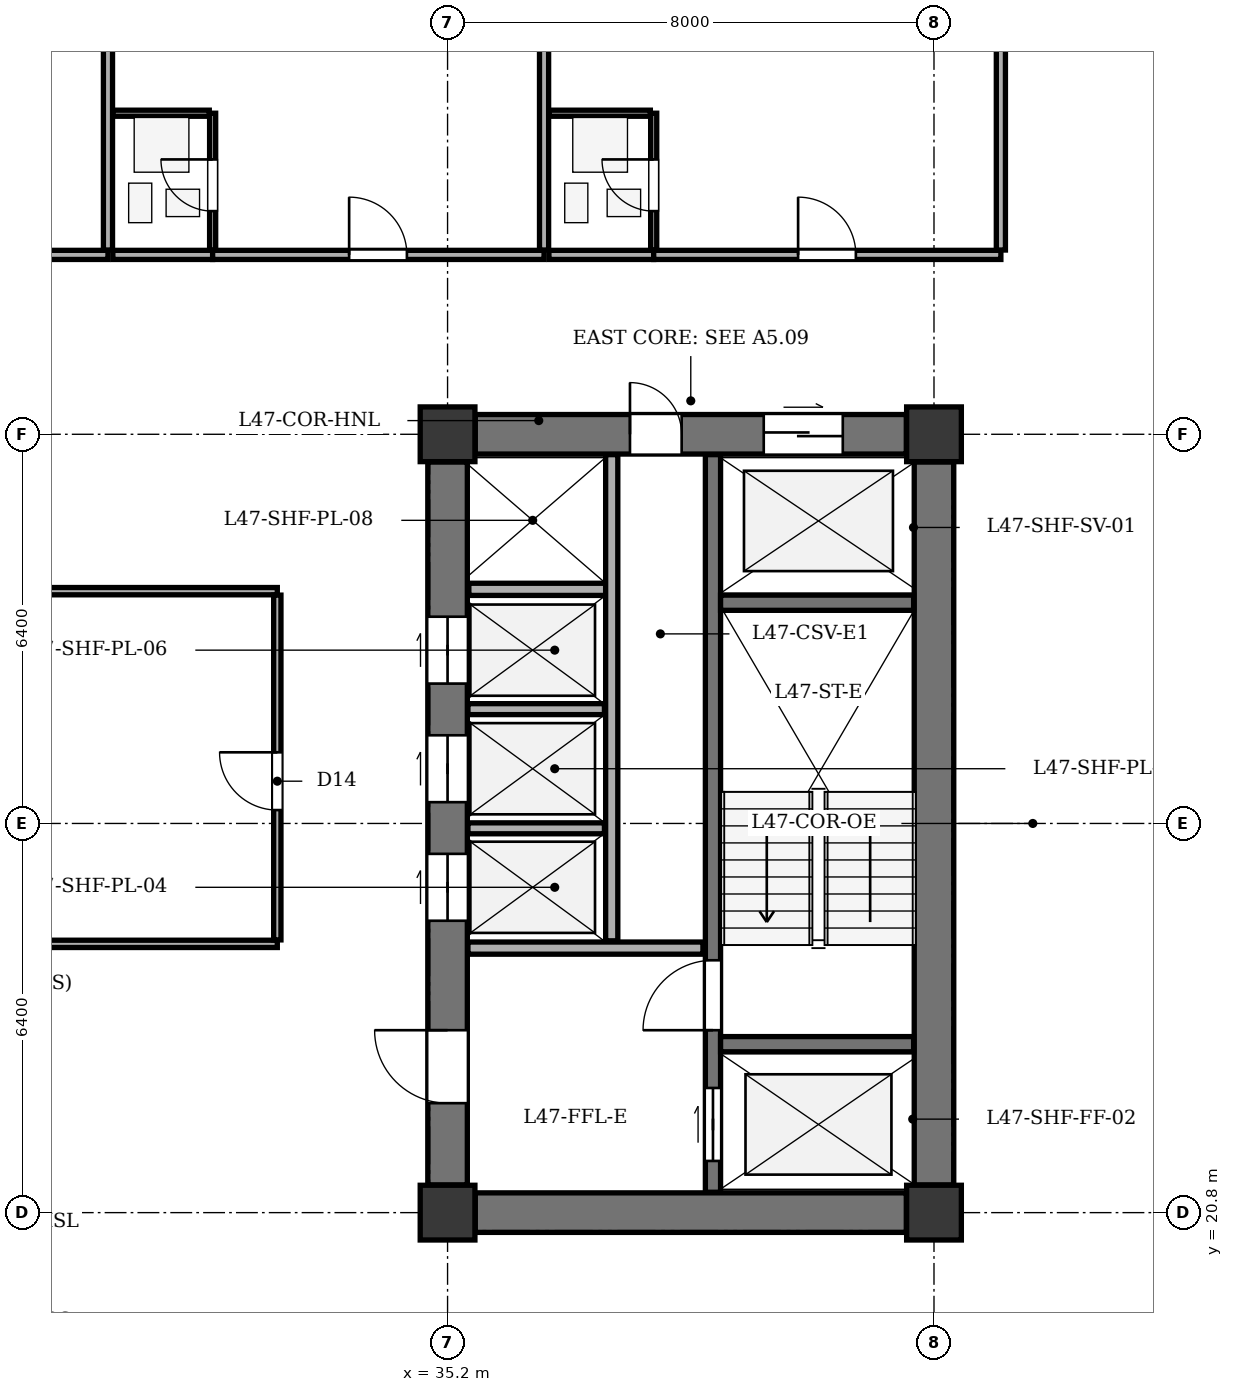
"""IFC4 building model, lengths in metres.
Left out: names, types, materials, properties, quantities, classifications, styles, units other than length and angle.
Written with IfcOpenShell. Run it as: python <this file> out.ifc"""

import sys

from ifc_helpers import new_model, si_unit, direction, frame, frame_2d, origin, origin_2d, place, context, subcontext, project, spatial, rectangle, extrude, element, fill, save


model = new_model("IFC4")
c1 = context("Model", 3, precision=1e-05, world=origin(), true_north=direction((0.0, 1.0)))
c2 = subcontext(c1, "Body", "Model", "MODEL_VIEW")
j1 = project(units=[si_unit("LENGTHUNIT", "METRE"), si_unit("PLANEANGLEUNIT", "RADIAN")], contexts=[c1])
p1 = place(None, origin())
s1 = spatial("IfcSite", under=j1, at=p1, CompositionType="ELEMENT")
p2 = place(p1, origin())
s2 = spatial("IfcBuilding", under=s1, at=p2, CompositionType="ELEMENT")
p3 = place(p2, frame((0.0, 0.0, 183.3)))
s3 = spatial("IfcBuildingStorey", under=s2, at=p3, CompositionType="ELEMENT", Elevation=183.3)
for number, where, z_axis, x_axis in (
    (1, (35.2, 20.8, 0.0), (0.0, 0.0, 1.0), (1.0, 0.0, 0.0)),
    (2, (43.2, 20.8, 0.0), (0.0, 0.0, 1.0), (1.0, 0.0, 0.0)),
    (3, (35.2, 33.6, 0.0), (0.0, 0.0, 1.0), (1.0, 0.0, 0.0)),
    (4, (43.2, 33.6, 0.0), (0.0, 0.0, 1.0), (1.0, 0.0, 0.0)),
):
    element("IfcColumn", number, at=place(p3, frame(where, z_axis=z_axis, x_axis=x_axis)), inside=s3, PredefinedType="COLUMN", context=c2, shape_type="SweptSolid", body=[
        extrude(rectangle(XDim=0.9, YDim=0.9, at=origin_2d()), origin(), (0.0, 0.0, 1.0), 3.5),
    ])
p4 = place(p3, frame((43.2, 21.255, 0.0), z_axis=(0.0, 0.0, 1.0), x_axis=(0.0, 1.0, 0.0)))
e5 = element("IfcWall", 5, at=p4, inside=s3, PredefinedType="SHEAR", context=c2, shape_type="SweptSolid", body=[
    extrude(rectangle(XDim=11.89, YDim=0.65, at=frame_2d((5.945, 0.0))), origin(), (0.0, 0.0, 1.0), 3.2),
])
p5 = place(p3, frame((35.655, 20.8, 0.0), z_axis=(0.0, 0.0, 1.0), x_axis=(1.0, 0.0, 0.0)))
e6 = element("IfcWall", 6, at=p5, inside=s3, PredefinedType="SHEAR", context=c2, shape_type="SweptSolid", body=[
    extrude(rectangle(XDim=7.09, YDim=0.65, at=frame_2d((3.545, 0.0))), origin(), (0.0, 0.0, 1.0), 3.2),
])
p6 = place(p3, frame((35.655, 33.6, 0.0), z_axis=(0.0, 0.0, 1.0), x_axis=(1.0, 0.0, 0.0)))
e7 = element("IfcWall", 7, at=p6, inside=s3, PredefinedType="SHEAR", context=c2, shape_type="SweptSolid", body=[
    extrude(rectangle(XDim=7.09, YDim=0.65, at=frame_2d((3.545, 0.0))), origin(), (0.0, 0.0, 1.0), 3.2),
])
p7 = place(p6, frame((4.745, 0.0, 0.0)))
e8 = element("IfcOpeningElement", 8, at=p7, cuts=e7, PredefinedType="OPENING", context=c2, shape_type="SweptSolid", body=[
    extrude(rectangle(XDim=1.3, YDim=2.15, at=frame_2d((0.65, 1.075))), frame((0.0, 0.335, 0.0), z_axis=(0.0, -1.0, 0.0), x_axis=(1.0, 0.0, 0.0)), (0.0, 0.0, 1.0), 0.67),
])
p8 = place(p6, frame((2.545, 0.0, 0.0)))
e9 = element("IfcOpeningElement", 9, at=p8, cuts=e7, PredefinedType="OPENING", context=c2, shape_type="SweptSolid", body=[
    extrude(rectangle(XDim=0.85, YDim=2.02, at=frame_2d((0.425, 1.01))), frame((0.0, 0.335, 0.0), z_axis=(0.0, -1.0, 0.0), x_axis=(1.0, 0.0, 0.0)), (0.0, 0.0, 1.0), 0.67),
])
p9 = place(p3, frame((35.2, 21.255, 0.0), z_axis=(0.0, 0.0, 1.0), x_axis=(0.0, 1.0, 0.0)))
e10 = element("IfcWall", 10, at=p9, inside=s3, PredefinedType="SHEAR", context=c2, shape_type="SweptSolid", body=[
    extrude(rectangle(XDim=11.89, YDim=0.65, at=frame_2d((5.945, 0.0))), origin(), (0.0, 0.0, 1.0), 3.2),
])
p10 = place(p9, frame((1.345, 0.0, 0.0)))
e11 = element("IfcOpeningElement", 11, at=p10, cuts=e10, PredefinedType="OPENING", context=c2, shape_type="SweptSolid", body=[
    extrude(rectangle(XDim=1.2, YDim=2.15, at=frame_2d((0.6, 1.075))), frame((0.0, 0.335, 0.0), z_axis=(0.0, -1.0, 0.0), x_axis=(1.0, 0.0, 0.0)), (0.0, 0.0, 1.0), 0.67),
])
p11 = place(p9, frame((4.345, 0.0, 0.0)))
e12 = element("IfcOpeningElement", 12, at=p11, cuts=e10, PredefinedType="OPENING", context=c2, shape_type="SweptSolid", body=[
    extrude(rectangle(XDim=1.1, YDim=2.1, at=frame_2d((0.55, 1.05))), frame((0.0, 0.335, 0.0), z_axis=(0.0, -1.0, 0.0), x_axis=(1.0, 0.0, 0.0)), (0.0, 0.0, 1.0), 0.67),
])
p12 = place(p9, frame((6.295, 0.0, 0.0)))
e13 = element("IfcOpeningElement", 13, at=p12, cuts=e10, PredefinedType="OPENING", context=c2, shape_type="SweptSolid", body=[
    extrude(rectangle(XDim=1.1, YDim=2.1, at=frame_2d((0.55, 1.05))), frame((0.0, 0.335, 0.0), z_axis=(0.0, -1.0, 0.0), x_axis=(1.0, 0.0, 0.0)), (0.0, 0.0, 1.0), 0.67),
])
p13 = place(p9, frame((8.245, 0.0, 0.0)))
e14 = element("IfcOpeningElement", 14, at=p13, cuts=e10, PredefinedType="OPENING", context=c2, shape_type="SweptSolid", body=[
    extrude(rectangle(XDim=1.1, YDim=2.1, at=frame_2d((0.55, 1.05))), frame((0.0, 0.335, 0.0), z_axis=(0.0, -1.0, 0.0), x_axis=(1.0, 0.0, 0.0)), (0.0, 0.0, 1.0), 0.67),
])
p14 = place(p3, frame((39.565, 21.135, 0.0), z_axis=(0.0, 0.0, 1.0), x_axis=(0.0, 1.0, 0.0)))
e15 = element("IfcWall", 15, at=p14, inside=s3, PredefinedType="SHEAR", context=c2, shape_type="SweptSolid", body=[
    extrude(rectangle(XDim=12.13, YDim=0.25, at=frame_2d((6.065, 0.0))), origin(), (0.0, 0.0, 1.0), 3.2),
])
p15 = place(p14, frame((0.515, 0.0, 0.0)))
e16 = element("IfcOpeningElement", 16, at=p15, cuts=e15, PredefinedType="OPENING", context=c2, shape_type="SweptSolid", body=[
    extrude(rectangle(XDim=1.2, YDim=2.15, at=frame_2d((0.6, 1.075))), frame((0.0, 0.135, 0.0), z_axis=(0.0, -1.0, 0.0), x_axis=(1.0, 0.0, 0.0)), (0.0, 0.0, 1.0), 0.27),
])
p16 = place(p14, frame((2.665, 0.0, 0.0)))
e17 = element("IfcOpeningElement", 17, at=p16, cuts=e15, PredefinedType="OPENING", context=c2, shape_type="SweptSolid", body=[
    extrude(rectangle(XDim=1.15, YDim=2.15, at=frame_2d((0.575, 1.075))), frame((0.0, 0.135, 0.0), z_axis=(0.0, -1.0, 0.0), x_axis=(1.0, 0.0, 0.0)), (0.0, 0.0, 1.0), 0.27),
])
for number, where, z_axis, x_axis in (
    (18, (39.69, 23.57, 0.0), (0.0, 0.0, 1.0), (1.0, 0.0, 0.0)),
    (19, (39.69, 30.83, 0.0), (0.0, 0.0, 1.0), (1.0, 0.0, 0.0)),
):
    element("IfcWall", number, at=place(p3, frame(where, z_axis=z_axis, x_axis=x_axis)), inside=s3, PredefinedType="SHEAR", context=c2, shape_type="SweptSolid", body=[
        extrude(rectangle(XDim=3.175, YDim=0.25, at=frame_2d((1.587, 0.0))), origin(), (0.0, 0.0, 1.0), 3.2),
    ])
p17 = place(p3, frame((35.535, 25.15, 0.0), z_axis=(0.0, 0.0, 1.0), x_axis=(1.0, 0.0, 0.0)))
e20 = element("IfcWall", 20, at=p17, inside=s3, PredefinedType="SOLIDWALL", context=c2, shape_type="SweptSolid", body=[
    extrude(rectangle(XDim=3.865, YDim=0.2, at=frame_2d((1.933, 0.0))), origin(), (0.0, 0.0, 1.0), 3.2),
])
p18 = place(p3, frame((35.55, 31.05, 0.0), z_axis=(0.0, 0.0, 1.0), x_axis=(1.0, 0.0, 0.0)))
e21 = element("IfcWall", 21, at=p18, inside=s3, PredefinedType="SOLIDWALL", context=c2, shape_type="SweptSolid", body=[
    extrude(rectangle(XDim=2.25, YDim=0.2, at=frame_2d((1.125, 0.0))), origin(), (0.0, 0.0, 1.0), 3.2),
])
p19 = place(p3, frame((37.9, 25.27, 0.0), z_axis=(0.0, 0.0, 1.0), x_axis=(0.0, 1.0, 0.0)))
e22 = element("IfcWall", 22, at=p19, inside=s3, PredefinedType="SOLIDWALL", context=c2, shape_type="SweptSolid", body=[
    extrude(rectangle(XDim=7.995, YDim=0.2, at=frame_2d((3.998, 0.0))), origin(), (0.0, 0.0, 1.0), 3.2),
])
for number, where, z_axis, x_axis in (
    (23, (35.535, 27.12, 0.0), (0.0, 0.0, 1.0), (1.0, 0.0, 0.0)),
    (24, (35.535, 29.08, 0.0), (0.0, 0.0, 1.0), (1.0, 0.0, 0.0)),
):
    element("IfcWall", number, at=place(p3, frame(where, z_axis=z_axis, x_axis=x_axis)), inside=s3, PredefinedType="PARTITIONING", context=c2, shape_type="SweptSolid", body=[
        extrude(rectangle(XDim=2.245, YDim=0.18, at=frame_2d((1.123, 0.0))), origin(), (0.0, 0.0, 1.0), 3.2),
    ])
p20 = place(p3, frame((20.46, 25.22, 0.0), z_axis=(0.0, 0.0, 1.0), x_axis=(1.0, 0.0, 0.0)))
e25 = element("IfcWall", 25, at=p20, inside=s3, PredefinedType="PARTITIONING", context=c2, shape_type="SweptSolid", body=[
    extrude(rectangle(XDim=11.94, YDim=0.12, at=frame_2d((5.97, 0.0))), origin(), (0.0, 0.0, 1.0), 3.2),
])
p21 = place(p20, frame((0.68, 0.0, 0.0)))
e26 = element("IfcOpeningElement", 26, at=p21, cuts=e25, PredefinedType="OPENING", context=c2, shape_type="SweptSolid", body=[
    extrude(rectangle(XDim=1.0, YDim=2.1, at=frame_2d((0.5, 1.05))), frame((0.0, 0.07, 0.0), z_axis=(0.0, -1.0, 0.0), x_axis=(1.0, 0.0, 0.0)), (0.0, 0.0, 1.0), 0.14),
])
p22 = place(p3, frame((20.46, 31.02, 0.0), z_axis=(0.0, 0.0, 1.0), x_axis=(1.0, 0.0, 0.0)))
e27 = element("IfcWall", 27, at=p22, inside=s3, PredefinedType="PARTITIONING", context=c2, shape_type="SweptSolid", body=[
    extrude(rectangle(XDim=11.94, YDim=0.12, at=frame_2d((5.97, 0.0))), origin(), (0.0, 0.0, 1.0), 3.2),
])
p23 = place(p3, frame((32.4, 25.285, 0.0), z_axis=(0.0, 0.0, 1.0), x_axis=(0.0, 1.0, 0.0)))
e28 = element("IfcWall", 28, at=p23, inside=s3, PredefinedType="PARTITIONING", context=c2, shape_type="SweptSolid", body=[
    extrude(rectangle(XDim=5.67, YDim=0.12, at=frame_2d((2.835, 0.0))), origin(), (0.0, 0.0, 1.0), 3.2),
])
p24 = place(p23, frame((2.135, 0.0, 0.0)))
e29 = element("IfcOpeningElement", 29, at=p24, cuts=e28, PredefinedType="OPENING", context=c2, shape_type="SweptSolid", body=[
    extrude(rectangle(XDim=0.95, YDim=2.1, at=frame_2d((0.475, 1.05))), frame((0.0, 0.07, 0.0), z_axis=(0.0, -1.0, 0.0), x_axis=(1.0, 0.0, 0.0)), (0.0, 0.0, 1.0), 0.14),
])
p25 = place(p3, frame((24.435, 36.55, 0.0), z_axis=(0.0, 0.0, 1.0), x_axis=(1.0, 0.0, 0.0)))
e30 = element("IfcWall", 30, at=p25, inside=s3, PredefinedType="PARTITIONING", context=c2, shape_type="SweptSolid", body=[
    extrude(rectangle(XDim=5.18, YDim=0.15, at=frame_2d((2.59, 0.0))), origin(), (0.0, 0.0, 1.0), 3.2),
])
p26 = place(p25, frame((2.11, 0.0, 0.0)))
e31 = element("IfcOpeningElement", 31, at=p26, cuts=e30, PredefinedType="OPENING", context=c2, shape_type="SweptSolid", body=[
    extrude(rectangle(XDim=0.95, YDim=2.1, at=frame_2d((0.475, 1.05))), frame((0.0, 0.085, 0.0), z_axis=(0.0, -1.0, 0.0), x_axis=(1.0, 0.0, 0.0)), (0.0, 0.0, 1.0), 0.17),
])
p27 = place(p3, frame((29.615, 36.63, 0.0), z_axis=(0.0, 0.0, 1.0), x_axis=(0.0, 1.0, 0.0)))
e32 = element("IfcWall", 32, at=p27, inside=s3, PredefinedType="PARTITIONING", context=c2, shape_type="SweptSolid", body=[
    extrude(rectangle(XDim=15.895, YDim=0.15, at=frame_2d((7.948, 0.0))), origin(), (0.0, 0.0, 1.0), 2.785),
])
p28 = place(p3, frame((29.695, 36.55, 0.0), z_axis=(0.0, 0.0, 1.0), x_axis=(1.0, 0.0, 0.0)))
e33 = element("IfcWall", 33, at=p28, inside=s3, PredefinedType="PARTITIONING", context=c2, shape_type="SweptSolid", body=[
    extrude(rectangle(XDim=1.641, YDim=0.15, at=frame_2d((0.821, 0.0))), origin(), (0.0, 0.0, 1.0), 3.2),
])
p29 = place(p3, frame((31.336, 36.55, 0.0), z_axis=(0.0, 0.0, 1.0), x_axis=(1.0, 0.0, 0.0)))
e34 = element("IfcWall", 34, at=p29, inside=s3, PredefinedType="PARTITIONING", context=c2, shape_type="SweptSolid", body=[
    extrude(rectangle(XDim=5.451, YDim=0.15, at=frame_2d((2.726, 0.0))), origin(), (0.0, 0.0, 1.0), 3.2),
])
p30 = place(p29, frame((2.245, 0.0, 0.0)))
e35 = element("IfcOpeningElement", 35, at=p30, cuts=e34, PredefinedType="OPENING", context=c2, shape_type="SweptSolid", body=[
    extrude(rectangle(XDim=0.95, YDim=2.1, at=frame_2d((0.475, 1.05))), frame((0.0, 0.085, 0.0), z_axis=(0.0, -1.0, 0.0), x_axis=(1.0, 0.0, 0.0)), (0.0, 0.0, 1.0), 0.17),
])
p31 = place(p3, frame((31.336, 36.63, 0.0), z_axis=(0.0, 0.0, 1.0), x_axis=(0.0, 1.0, 0.0)))
e36 = element("IfcWall", 36, at=p31, inside=s3, PredefinedType="PARTITIONING", context=c2, shape_type="SweptSolid", body=[
    extrude(rectangle(XDim=2.25, YDim=0.1, at=frame_2d((1.125, 0.0))), origin(), (0.0, 0.0, 1.0), 3.2),
])
p32 = place(p31, frame((0.64, 0.0, 0.0)))
e37 = element("IfcOpeningElement", 37, at=p32, cuts=e36, PredefinedType="OPENING", context=c2, shape_type="SweptSolid", body=[
    extrude(rectangle(XDim=0.85, YDim=2.05, at=frame_2d((0.425, 1.025))), frame((0.0, 0.06, 0.0), z_axis=(0.0, -1.0, 0.0), x_axis=(1.0, 0.0, 0.0)), (0.0, 0.0, 1.0), 0.12),
])
p33 = place(p3, frame((29.695, 38.88, 0.0), z_axis=(0.0, 0.0, 1.0), x_axis=(1.0, 0.0, 0.0)))
e38 = element("IfcWall", 38, at=p33, inside=s3, PredefinedType="PARTITIONING", context=c2, shape_type="SweptSolid", body=[
    extrude(rectangle(XDim=1.586, YDim=0.1, at=frame_2d((0.793, 0.0))), origin(), (0.0, 0.0, 1.0), 3.2),
])
p34 = place(p3, frame((36.787, 36.63, 0.0), z_axis=(0.0, 0.0, 1.0), x_axis=(0.0, 1.0, 0.0)))
e39 = element("IfcWall", 39, at=p34, inside=s3, PredefinedType="PARTITIONING", context=c2, shape_type="SweptSolid", body=[
    extrude(rectangle(XDim=15.895, YDim=0.15, at=frame_2d((7.948, 0.0))), origin(), (0.0, 0.0, 1.0), 3.2),
])
p35 = place(p3, frame((36.867, 36.55, 0.0), z_axis=(0.0, 0.0, 1.0), x_axis=(1.0, 0.0, 0.0)))
e40 = element("IfcWall", 40, at=p35, inside=s3, PredefinedType="PARTITIONING", context=c2, shape_type="SweptSolid", body=[
    extrude(rectangle(XDim=1.723, YDim=0.15, at=frame_2d((0.862, 0.0))), origin(), (0.0, 0.0, 1.0), 3.2),
])
p36 = place(p3, frame((38.59, 36.55, 0.0), z_axis=(0.0, 0.0, 1.0), x_axis=(1.0, 0.0, 0.0)))
e41 = element("IfcWall", 41, at=p36, inside=s3, PredefinedType="PARTITIONING", context=c2, shape_type="SweptSolid", body=[
    extrude(rectangle(XDim=5.71, YDim=0.15, at=frame_2d((2.855, 0.0))), origin(), (0.0, 0.0, 1.0), 3.2),
])
p37 = place(p36, frame((2.375, 0.0, 0.0)))
e42 = element("IfcOpeningElement", 42, at=p37, cuts=e41, PredefinedType="OPENING", context=c2, shape_type="SweptSolid", body=[
    extrude(rectangle(XDim=0.95, YDim=2.1, at=frame_2d((0.475, 1.05))), frame((0.0, 0.085, 0.0), z_axis=(0.0, -1.0, 0.0), x_axis=(1.0, 0.0, 0.0)), (0.0, 0.0, 1.0), 0.17),
])
p38 = place(p3, frame((38.59, 36.63, 0.0), z_axis=(0.0, 0.0, 1.0), x_axis=(0.0, 1.0, 0.0)))
e43 = element("IfcWall", 43, at=p38, inside=s3, PredefinedType="PARTITIONING", context=c2, shape_type="SweptSolid", body=[
    extrude(rectangle(XDim=2.25, YDim=0.1, at=frame_2d((1.125, 0.0))), origin(), (0.0, 0.0, 1.0), 3.2),
])
p39 = place(p38, frame((0.64, 0.0, 0.0)))
e44 = element("IfcOpeningElement", 44, at=p39, cuts=e43, PredefinedType="OPENING", context=c2, shape_type="SweptSolid", body=[
    extrude(rectangle(XDim=0.85, YDim=2.05, at=frame_2d((0.425, 1.025))), frame((0.0, 0.06, 0.0), z_axis=(0.0, -1.0, 0.0), x_axis=(1.0, 0.0, 0.0)), (0.0, 0.0, 1.0), 0.12),
])
p40 = place(p3, frame((36.867, 38.88, 0.0), z_axis=(0.0, 0.0, 1.0), x_axis=(1.0, 0.0, 0.0)))
e45 = element("IfcWall", 45, at=p40, inside=s3, PredefinedType="PARTITIONING", context=c2, shape_type="SweptSolid", body=[
    extrude(rectangle(XDim=1.668, YDim=0.1, at=frame_2d((0.834, 0.0))), origin(), (0.0, 0.0, 1.0), 3.2),
])
p41 = place(p3, frame((44.3, 36.63, 0.0), z_axis=(0.0, 0.0, 1.0), x_axis=(0.0, 1.0, 0.0)))
e46 = element("IfcWall", 46, at=p41, inside=s3, PredefinedType="PARTITIONING", context=c2, shape_type="SweptSolid", body=[
    extrude(rectangle(XDim=15.895, YDim=0.15, at=frame_2d((7.948, 0.0))), origin(), (0.0, 0.0, 1.0), 3.2),
])
p42 = place(p7, origin())
e47 = element("IfcDoor", 47, at=p42, inside=s3, OperationType="DOUBLE_DOOR_SLIDING", PredefinedType="DOOR", context=c2, shape_type="SweptSolid", body=[
    extrude(rectangle(XDim=1.3, YDim=2.15, at=frame_2d((0.65, 1.075))), frame((0.0, 0.025, 0.0), z_axis=(0.0, -1.0, 0.0), x_axis=(1.0, 0.0, 0.0)), (0.0, 0.0, 1.0), 0.05),
])
fill(e8, e47)
p43 = place(p8, origin())
e48 = element("IfcDoor", 48, at=p43, inside=s3, OperationType="SINGLE_SWING_LEFT", PredefinedType="DOOR", context=c2, shape_type="SweptSolid", body=[
    extrude(rectangle(XDim=0.85, YDim=2.02, at=frame_2d((0.425, 1.01))), frame((0.0, 0.025, 0.0), z_axis=(0.0, -1.0, 0.0), x_axis=(1.0, 0.0, 0.0)), (0.0, 0.0, 1.0), 0.05),
])
fill(e9, e48)
p44 = place(p10, origin())
e49 = element("IfcDoor", 49, at=p44, inside=s3, OperationType="SINGLE_SWING_RIGHT", PredefinedType="DOOR", context=c2, shape_type="SweptSolid", body=[
    extrude(rectangle(XDim=1.2, YDim=2.15, at=frame_2d((0.6, 1.075))), frame((0.0, 0.025, 0.0), z_axis=(0.0, -1.0, 0.0), x_axis=(1.0, 0.0, 0.0)), (0.0, 0.0, 1.0), 0.05),
])
fill(e11, e49)
p45 = place(p11, origin())
e50 = element("IfcDoor", 50, at=p45, inside=s3, OperationType="DOUBLE_DOOR_SLIDING", PredefinedType="DOOR", context=c2, shape_type="SweptSolid", body=[
    extrude(rectangle(XDim=1.1, YDim=2.1, at=frame_2d((0.55, 1.05))), frame((0.0, 0.025, 0.0), z_axis=(0.0, -1.0, 0.0), x_axis=(1.0, 0.0, 0.0)), (0.0, 0.0, 1.0), 0.05),
])
fill(e12, e50)
p46 = place(p12, origin())
e51 = element("IfcDoor", 51, at=p46, inside=s3, OperationType="DOUBLE_DOOR_SLIDING", PredefinedType="DOOR", context=c2, shape_type="SweptSolid", body=[
    extrude(rectangle(XDim=1.1, YDim=2.1, at=frame_2d((0.55, 1.05))), frame((0.0, 0.025, 0.0), z_axis=(0.0, -1.0, 0.0), x_axis=(1.0, 0.0, 0.0)), (0.0, 0.0, 1.0), 0.05),
])
fill(e13, e51)
p47 = place(p13, origin())
e52 = element("IfcDoor", 52, at=p47, inside=s3, OperationType="DOUBLE_DOOR_SLIDING", PredefinedType="DOOR", context=c2, shape_type="SweptSolid", body=[
    extrude(rectangle(XDim=1.1, YDim=2.1, at=frame_2d((0.55, 1.05))), frame((0.0, 0.025, 0.0), z_axis=(0.0, -1.0, 0.0), x_axis=(1.0, 0.0, 0.0)), (0.0, 0.0, 1.0), 0.05),
])
fill(e14, e52)
p48 = place(p15, origin())
e53 = element("IfcDoor", 53, at=p48, inside=s3, OperationType="DOUBLE_DOOR_SLIDING", PredefinedType="DOOR", context=c2, shape_type="SweptSolid", body=[
    extrude(rectangle(XDim=1.2, YDim=2.15, at=frame_2d((0.6, 1.075))), frame((0.0, 0.025, 0.0), z_axis=(0.0, -1.0, 0.0), x_axis=(1.0, 0.0, 0.0)), (0.0, 0.0, 1.0), 0.05),
])
fill(e16, e53)
p49 = place(p16, origin())
e54 = element("IfcDoor", 54, at=p49, inside=s3, OperationType="SINGLE_SWING_LEFT", PredefinedType="DOOR", context=c2, shape_type="SweptSolid", body=[
    extrude(rectangle(XDim=1.15, YDim=2.15, at=frame_2d((0.575, 1.075))), frame((0.0, 0.025, 0.0), z_axis=(0.0, -1.0, 0.0), x_axis=(1.0, 0.0, 0.0)), (0.0, 0.0, 1.0), 0.05),
])
fill(e17, e54)
p50 = place(p24, origin())
e55 = element("IfcDoor", 55, at=p50, inside=s3, OperationType="SINGLE_SWING_RIGHT", PredefinedType="DOOR", context=c2, shape_type="SweptSolid", body=[
    extrude(rectangle(XDim=0.95, YDim=2.1, at=frame_2d((0.475, 1.05))), frame((0.0, 0.025, 0.0), z_axis=(0.0, -1.0, 0.0), x_axis=(1.0, 0.0, 0.0)), (0.0, 0.0, 1.0), 0.05),
])
fill(e29, e55)
p51 = place(p32, origin())
e56 = element("IfcDoor", 56, at=p51, inside=s3, OperationType="SINGLE_SWING_RIGHT", PredefinedType="DOOR", context=c2, shape_type="SweptSolid", body=[
    extrude(rectangle(XDim=0.85, YDim=2.05, at=frame_2d((0.425, 1.025))), frame((0.0, 0.025, 0.0), z_axis=(0.0, -1.0, 0.0), x_axis=(1.0, 0.0, 0.0)), (0.0, 0.0, 1.0), 0.05),
])
fill(e37, e56)
p52 = place(p30, origin())
e57 = element("IfcDoor", 57, at=p52, inside=s3, OperationType="SINGLE_SWING_LEFT", PredefinedType="DOOR", context=c2, shape_type="SweptSolid", body=[
    extrude(rectangle(XDim=0.95, YDim=2.1, at=frame_2d((0.475, 1.05))), frame((0.0, 0.025, 0.0), z_axis=(0.0, -1.0, 0.0), x_axis=(1.0, 0.0, 0.0)), (0.0, 0.0, 1.0), 0.05),
])
fill(e35, e57)
p53 = place(p39, origin())
e58 = element("IfcDoor", 58, at=p53, inside=s3, OperationType="SINGLE_SWING_RIGHT", PredefinedType="DOOR", context=c2, shape_type="SweptSolid", body=[
    extrude(rectangle(XDim=0.85, YDim=2.05, at=frame_2d((0.425, 1.025))), frame((0.0, 0.025, 0.0), z_axis=(0.0, -1.0, 0.0), x_axis=(1.0, 0.0, 0.0)), (0.0, 0.0, 1.0), 0.05),
])
fill(e44, e58)
p54 = place(p37, origin())
e59 = element("IfcDoor", 59, at=p54, inside=s3, OperationType="SINGLE_SWING_LEFT", PredefinedType="DOOR", context=c2, shape_type="SweptSolid", body=[
    extrude(rectangle(XDim=0.95, YDim=2.1, at=frame_2d((0.475, 1.05))), frame((0.0, 0.025, 0.0), z_axis=(0.0, -1.0, 0.0), x_axis=(1.0, 0.0, 0.0)), (0.0, 0.0, 1.0), 0.05),
])
fill(e42, e59)
save(model, sys.argv[1])
